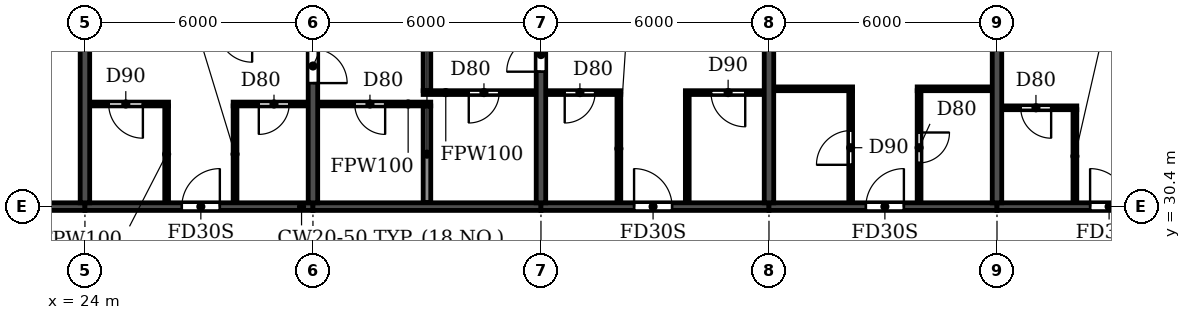
"""IFC4 building model, lengths in metres.
Left out: names, types, materials, properties, quantities, classifications, styles, units other than length and angle.
Written with IfcOpenShell. Run it as: python <this file> out.ifc"""

import sys

from ifc_helpers import new_model, si_unit, direction, frame, frame_2d, origin, place, context, subcontext, project, spatial, rectangle, extrude, element, fill, save


model = new_model("IFC4")
c1 = context("Model", 3, precision=1e-05, world=origin(), true_north=direction((0.0, 1.0)))
c2 = subcontext(c1, "Body", "Model", "MODEL_VIEW")
j1 = project(units=[si_unit("LENGTHUNIT", "METRE"), si_unit("PLANEANGLEUNIT", "RADIAN")], contexts=[c1])
p1 = place(None, origin())
s1 = spatial("IfcSite", under=j1, at=p1, CompositionType="ELEMENT")
p2 = place(p1, origin())
s2 = spatial("IfcBuilding", under=s1, at=p2, CompositionType="ELEMENT")
p3 = place(p2, frame((0.0, 0.0, 231.3)))
s3 = spatial("IfcBuildingStorey", under=s2, at=p3, CompositionType="ELEMENT", Elevation=231.3)
p4 = place(p3, frame((24.0, 30.5, 0.0), z_axis=(0.0, 0.0, 1.0), x_axis=(0.0, 1.0, 0.0)))
e1 = element("IfcWall", 1, at=p4, inside=s3, PredefinedType="SHEAR", context=c2, shape_type="SweptSolid", body=[
    extrude(rectangle(XDim=10.5, YDim=0.25, at=frame_2d((5.25, 0.0))), origin(), (0.0, 0.0, 1.0), 3.08),
])
p5 = place(p3, frame((30.0, 30.5, 0.0), z_axis=(0.0, 0.0, 1.0), x_axis=(0.0, 1.0, 0.0)))
e2 = element("IfcWall", 2, at=p5, inside=s3, PredefinedType="SHEAR", context=c2, shape_type="SweptSolid", body=[
    extrude(rectangle(XDim=10.5, YDim=0.25, at=frame_2d((5.25, 0.0))), origin(), (0.0, 0.0, 1.0), 3.08),
])
p6 = place(p5, frame((3.15, 0.0, 0.0)))
e3 = element("IfcOpeningElement", 3, at=p6, cuts=e2, PredefinedType="OPENING", context=c2, shape_type="SweptSolid", body=[
    extrude(rectangle(XDim=0.9, YDim=2.1, at=frame_2d((0.45, 1.05))), frame((0.0, 0.135, 0.0), z_axis=(0.0, -1.0, 0.0), x_axis=(1.0, 0.0, 0.0)), (0.0, 0.0, 1.0), 0.27),
])
p7 = place(p3, frame((36.0, 30.5, 0.0), z_axis=(0.0, 0.0, 1.0), x_axis=(0.0, 1.0, 0.0)))
e4 = element("IfcWall", 4, at=p7, inside=s3, PredefinedType="SHEAR", context=c2, shape_type="SweptSolid", body=[
    extrude(rectangle(XDim=10.5, YDim=0.25, at=frame_2d((5.25, 0.0))), origin(), (0.0, 0.0, 1.0), 3.08),
])
p8 = place(p7, frame((3.45, 0.0, 0.0)))
e5 = element("IfcOpeningElement", 5, at=p8, cuts=e4, PredefinedType="OPENING", context=c2, shape_type="SweptSolid", body=[
    extrude(rectangle(XDim=0.9, YDim=2.1, at=frame_2d((0.45, 1.05))), frame((0.0, 0.135, 0.0), z_axis=(0.0, -1.0, 0.0), x_axis=(1.0, 0.0, 0.0)), (0.0, 0.0, 1.0), 0.27),
])
for number, where, z_axis, x_axis in (
    (6, (42.0, 30.5, 0.0), (0.0, 0.0, 1.0), (0.0, 1.0, 0.0)),
    (7, (48.0, 30.5, 0.0), (0.0, 0.0, 1.0), (0.0, 1.0, 0.0)),
):
    element("IfcWall", number, at=place(p3, frame(where, z_axis=z_axis, x_axis=x_axis)), inside=s3, PredefinedType="SHEAR", context=c2, shape_type="SweptSolid", body=[
        extrude(rectangle(XDim=10.5, YDim=0.25, at=frame_2d((5.25, 0.0))), origin(), (0.0, 0.0, 1.0), 3.08),
    ])
p9 = place(p3, frame((18.2, 30.4, 0.0), z_axis=(0.0, 0.0, 1.0), x_axis=(1.0, 0.0, 0.0)))
e8 = element("IfcWall", 8, at=p9, inside=s3, PredefinedType="SHEAR", context=c2, shape_type="SweptSolid", body=[
    extrude(rectangle(XDim=5.8, YDim=0.2, at=frame_2d((2.9, 0.0))), origin(), (0.0, 0.0, 1.0), 2.48),
])
p10 = place(p9, frame((2.3, 0.0, 0.0)))
e9 = element("IfcOpeningElement", 9, at=p10, cuts=e8, PredefinedType="OPENING", context=c2, shape_type="SweptSolid", body=[
    extrude(rectangle(XDim=1.0, YDim=2.1, at=frame_2d((0.5, 1.05))), frame((0.0, 0.11, 0.0), z_axis=(0.0, -1.0, 0.0), x_axis=(1.0, 0.0, 0.0)), (0.0, 0.0, 1.0), 0.22),
])
p11 = place(p3, frame((24.0, 30.4, 0.0), z_axis=(0.0, 0.0, 1.0), x_axis=(1.0, 0.0, 0.0)))
e10 = element("IfcWall", 10, at=p11, inside=s3, PredefinedType="SHEAR", context=c2, shape_type="SweptSolid", body=[
    extrude(rectangle(XDim=6.0, YDim=0.2, at=frame_2d((3.0, 0.0))), origin(), (0.0, 0.0, 1.0), 2.48),
])
p12 = place(p11, frame((2.55, 0.0, 0.0)))
e11 = element("IfcOpeningElement", 11, at=p12, cuts=e10, PredefinedType="OPENING", context=c2, shape_type="SweptSolid", body=[
    extrude(rectangle(XDim=1.0, YDim=2.1, at=frame_2d((0.5, 1.05))), frame((0.0, 0.11, 0.0), z_axis=(0.0, -1.0, 0.0), x_axis=(1.0, 0.0, 0.0)), (0.0, 0.0, 1.0), 0.22),
])
p13 = place(p3, frame((30.0, 30.4, 0.0), z_axis=(0.0, 0.0, 1.0), x_axis=(1.0, 0.0, 0.0)))
e12 = element("IfcWall", 12, at=p13, inside=s3, PredefinedType="SHEAR", context=c2, shape_type="SweptSolid", body=[
    extrude(rectangle(XDim=6.0, YDim=0.2, at=frame_2d((3.0, 0.0))), origin(), (0.0, 0.0, 1.0), 2.48),
])
p14 = place(p3, frame((36.0, 30.4, 0.0), z_axis=(0.0, 0.0, 1.0), x_axis=(1.0, 0.0, 0.0)))
e13 = element("IfcWall", 13, at=p14, inside=s3, PredefinedType="SHEAR", context=c2, shape_type="SweptSolid", body=[
    extrude(rectangle(XDim=6.0, YDim=0.2, at=frame_2d((3.0, 0.0))), origin(), (0.0, 0.0, 1.0), 2.48),
])
p15 = place(p14, frame((2.45, 0.0, 0.0)))
e14 = element("IfcOpeningElement", 14, at=p15, cuts=e13, PredefinedType="OPENING", context=c2, shape_type="SweptSolid", body=[
    extrude(rectangle(XDim=1.0, YDim=2.1, at=frame_2d((0.5, 1.05))), frame((0.0, 0.11, 0.0), z_axis=(0.0, -1.0, 0.0), x_axis=(1.0, 0.0, 0.0)), (0.0, 0.0, 1.0), 0.22),
])
p16 = place(p3, frame((42.0, 30.4, 0.0), z_axis=(0.0, 0.0, 1.0), x_axis=(1.0, 0.0, 0.0)))
e15 = element("IfcWall", 15, at=p16, inside=s3, PredefinedType="SHEAR", context=c2, shape_type="SweptSolid", body=[
    extrude(rectangle(XDim=6.0, YDim=0.2, at=frame_2d((3.0, 0.0))), origin(), (0.0, 0.0, 1.0), 2.48),
])
p17 = place(p16, frame((2.55, 0.0, 0.0)))
e16 = element("IfcOpeningElement", 16, at=p17, cuts=e15, PredefinedType="OPENING", context=c2, shape_type="SweptSolid", body=[
    extrude(rectangle(XDim=1.0, YDim=2.1, at=frame_2d((0.5, 1.05))), frame((0.0, 0.11, 0.0), z_axis=(0.0, -1.0, 0.0), x_axis=(1.0, 0.0, 0.0)), (0.0, 0.0, 1.0), 0.22),
])
p18 = place(p3, frame((48.0, 30.4, 0.0), z_axis=(0.0, 0.0, 1.0), x_axis=(1.0, 0.0, 0.0)))
e17 = element("IfcWall", 17, at=p18, inside=s3, PredefinedType="SHEAR", context=c2, shape_type="SweptSolid", body=[
    extrude(rectangle(XDim=6.0, YDim=0.2, at=frame_2d((3.0, 0.0))), origin(), (0.0, 0.0, 1.0), 2.48),
])
p19 = place(p18, frame((2.45, 0.0, 0.0)))
e18 = element("IfcOpeningElement", 18, at=p19, cuts=e17, PredefinedType="OPENING", context=c2, shape_type="SweptSolid", body=[
    extrude(rectangle(XDim=1.0, YDim=2.1, at=frame_2d((0.5, 1.05))), frame((0.0, 0.11, 0.0), z_axis=(0.0, -1.0, 0.0), x_axis=(1.0, 0.0, 0.0)), (0.0, 0.0, 1.0), 0.22),
])
p20 = place(p3, frame((33.0, 30.51, 0.0), z_axis=(0.0, 0.0, 1.0), x_axis=(0.0, 1.0, 0.0)))
e19 = element("IfcWall", 19, at=p20, inside=s3, PredefinedType="PARTITIONING", context=c2, shape_type="SweptSolid", body=[
    extrude(rectangle(XDim=2.54, YDim=0.2, at=frame_2d((1.27, 0.0))), origin(), (0.0, 0.0, 1.0), 3.08),
])
p21 = place(p3, frame((33.0, 33.45, 0.0), z_axis=(0.0, 0.0, 1.0), x_axis=(0.0, 1.0, 0.0)))
e20 = element("IfcWall", 20, at=p21, inside=s3, PredefinedType="PARTITIONING", context=c2, shape_type="SweptSolid", body=[
    extrude(rectangle(XDim=7.69, YDim=0.2, at=frame_2d((3.845, 0.0))), origin(), (0.0, 0.0, 1.0), 3.08),
])
p22 = place(p3, frame((48.135, 33.0, 0.0), z_axis=(0.0, 0.0, 1.0), x_axis=(1.0, 0.0, 0.0)))
e21 = element("IfcWall", 21, at=p22, inside=s3, PredefinedType="PARTITIONING", context=c2, shape_type="SweptSolid", body=[
    extrude(rectangle(XDim=1.965, YDim=0.1, at=frame_2d((0.982, 0.0))), origin(), (0.0, 0.0, 1.0), 3.08),
])
p23 = place(p22, frame((0.49, 0.0, 0.0)))
e22 = element("IfcOpeningElement", 22, at=p23, cuts=e21, PredefinedType="OPENING", context=c2, shape_type="SweptSolid", body=[
    extrude(rectangle(XDim=0.8, YDim=2.1, at=frame_2d((0.4, 1.05))), frame((0.0, 0.06, 0.0), z_axis=(0.0, -1.0, 0.0), x_axis=(1.0, 0.0, 0.0)), (0.0, 0.0, 1.0), 0.12),
])
p24 = place(p3, frame((24.135, 33.1, 0.0), z_axis=(0.0, 0.0, 1.0), x_axis=(1.0, 0.0, 0.0)))
e23 = element("IfcWall", 23, at=p24, inside=s3, PredefinedType="PARTITIONING", context=c2, shape_type="SweptSolid", body=[
    extrude(rectangle(XDim=2.065, YDim=0.1, at=frame_2d((1.032, 0.0))), origin(), (0.0, 0.0, 1.0), 3.08),
])
p25 = place(p24, frame((0.49, 0.0, 0.0)))
e24 = element("IfcOpeningElement", 24, at=p25, cuts=e23, PredefinedType="OPENING", context=c2, shape_type="SweptSolid", body=[
    extrude(rectangle(XDim=0.9, YDim=2.1, at=frame_2d((0.45, 1.05))), frame((0.0, 0.06, 0.0), z_axis=(0.0, -1.0, 0.0), x_axis=(1.0, 0.0, 0.0)), (0.0, 0.0, 1.0), 0.12),
])
p26 = place(p3, frame((27.9, 33.1, 0.0), z_axis=(0.0, 0.0, 1.0), x_axis=(1.0, 0.0, 0.0)))
e25 = element("IfcWall", 25, at=p26, inside=s3, PredefinedType="PARTITIONING", context=c2, shape_type="SweptSolid", body=[
    extrude(rectangle(XDim=1.965, YDim=0.1, at=frame_2d((0.982, 0.0))), origin(), (0.0, 0.0, 1.0), 3.08),
])
p27 = place(p26, frame((0.675, 0.0, 0.0)))
e26 = element("IfcOpeningElement", 26, at=p27, cuts=e25, PredefinedType="OPENING", context=c2, shape_type="SweptSolid", body=[
    extrude(rectangle(XDim=0.8, YDim=2.1, at=frame_2d((0.4, 1.05))), frame((0.0, 0.06, 0.0), z_axis=(0.0, -1.0, 0.0), x_axis=(1.0, 0.0, 0.0)), (0.0, 0.0, 1.0), 0.12),
])
p28 = place(p3, frame((30.135, 33.1, 0.0), z_axis=(0.0, 0.0, 1.0), x_axis=(1.0, 0.0, 0.0)))
e27 = element("IfcWall", 27, at=p28, inside=s3, PredefinedType="PARTITIONING", context=c2, shape_type="SweptSolid", body=[
    extrude(rectangle(XDim=2.965, YDim=0.1, at=frame_2d((1.482, 0.0))), origin(), (0.0, 0.0, 1.0), 3.08),
])
p29 = place(p28, frame((0.965, 0.0, 0.0)))
e28 = element("IfcOpeningElement", 28, at=p29, cuts=e27, PredefinedType="OPENING", context=c2, shape_type="SweptSolid", body=[
    extrude(rectangle(XDim=0.8, YDim=2.1, at=frame_2d((0.4, 1.05))), frame((0.0, 0.06, 0.0), z_axis=(0.0, -1.0, 0.0), x_axis=(1.0, 0.0, 0.0)), (0.0, 0.0, 1.0), 0.12),
])
p30 = place(p3, frame((32.9, 33.4, 0.0), z_axis=(0.0, 0.0, 1.0), x_axis=(1.0, 0.0, 0.0)))
e29 = element("IfcWall", 29, at=p30, inside=s3, PredefinedType="PARTITIONING", context=c2, shape_type="SweptSolid", body=[
    extrude(rectangle(XDim=2.965, YDim=0.1, at=frame_2d((1.482, 0.0))), origin(), (0.0, 0.0, 1.0), 3.08),
])
p31 = place(p30, frame((1.2, 0.0, 0.0)))
e30 = element("IfcOpeningElement", 30, at=p31, cuts=e29, PredefinedType="OPENING", context=c2, shape_type="SweptSolid", body=[
    extrude(rectangle(XDim=0.8, YDim=2.1, at=frame_2d((0.4, 1.05))), frame((0.0, 0.06, 0.0), z_axis=(0.0, -1.0, 0.0), x_axis=(1.0, 0.0, 0.0)), (0.0, 0.0, 1.0), 0.12),
])
p32 = place(p3, frame((36.135, 33.4, 0.0), z_axis=(0.0, 0.0, 1.0), x_axis=(1.0, 0.0, 0.0)))
e31 = element("IfcWall", 31, at=p32, inside=s3, PredefinedType="PARTITIONING", context=c2, shape_type="SweptSolid", body=[
    extrude(rectangle(XDim=1.965, YDim=0.1, at=frame_2d((0.982, 0.0))), origin(), (0.0, 0.0, 1.0), 3.08),
])
p33 = place(p32, frame((0.49, 0.0, 0.0)))
e32 = element("IfcOpeningElement", 32, at=p33, cuts=e31, PredefinedType="OPENING", context=c2, shape_type="SweptSolid", body=[
    extrude(rectangle(XDim=0.8, YDim=2.1, at=frame_2d((0.4, 1.05))), frame((0.0, 0.06, 0.0), z_axis=(0.0, -1.0, 0.0), x_axis=(1.0, 0.0, 0.0)), (0.0, 0.0, 1.0), 0.12),
])
p34 = place(p3, frame((39.8, 33.4, 0.0), z_axis=(0.0, 0.0, 1.0), x_axis=(1.0, 0.0, 0.0)))
e33 = element("IfcWall", 33, at=p34, inside=s3, PredefinedType="PARTITIONING", context=c2, shape_type="SweptSolid", body=[
    extrude(rectangle(XDim=2.065, YDim=0.1, at=frame_2d((1.032, 0.0))), origin(), (0.0, 0.0, 1.0), 3.08),
])
p35 = place(p34, frame((0.675, 0.0, 0.0)))
e34 = element("IfcOpeningElement", 34, at=p35, cuts=e33, PredefinedType="OPENING", context=c2, shape_type="SweptSolid", body=[
    extrude(rectangle(XDim=0.9, YDim=2.1, at=frame_2d((0.45, 1.05))), frame((0.0, 0.06, 0.0), z_axis=(0.0, -1.0, 0.0), x_axis=(1.0, 0.0, 0.0)), (0.0, 0.0, 1.0), 0.12),
])
p36 = place(p3, frame((42.135, 33.5, 0.0), z_axis=(0.0, 0.0, 1.0), x_axis=(1.0, 0.0, 0.0)))
e35 = element("IfcWall", 35, at=p36, inside=s3, PredefinedType="PARTITIONING", context=c2, shape_type="SweptSolid", body=[
    extrude(rectangle(XDim=2.065, YDim=0.1, at=frame_2d((1.032, 0.0))), origin(), (0.0, 0.0, 1.0), 3.08),
])
p37 = place(p3, frame((45.9, 33.5, 0.0), z_axis=(0.0, 0.0, 1.0), x_axis=(1.0, 0.0, 0.0)))
e36 = element("IfcWall", 36, at=p37, inside=s3, PredefinedType="PARTITIONING", context=c2, shape_type="SweptSolid", body=[
    extrude(rectangle(XDim=1.965, YDim=0.1, at=frame_2d((0.982, 0.0))), origin(), (0.0, 0.0, 1.0), 3.08),
])
for number, where, z_axis, x_axis in (
    (37, (26.15, 30.51, 0.0), (0.0, 0.0, 1.0), (0.0, 1.0, 0.0)),
    (38, (27.95, 30.51, 0.0), (0.0, 0.0, 1.0), (0.0, 1.0, 0.0)),
):
    element("IfcWall", number, at=place(p3, frame(where, z_axis=z_axis, x_axis=x_axis)), inside=s3, PredefinedType="PARTITIONING", context=c2, shape_type="SweptSolid", body=[
        extrude(rectangle(XDim=2.54, YDim=0.1, at=frame_2d((1.27, 0.0))), origin(), (0.0, 0.0, 1.0), 3.08),
    ])
for number, where, z_axis, x_axis in (
    (39, (38.05, 30.51, 0.0), (0.0, 0.0, 1.0), (0.0, 1.0, 0.0)),
    (40, (39.85, 30.51, 0.0), (0.0, 0.0, 1.0), (0.0, 1.0, 0.0)),
):
    element("IfcWall", number, at=place(p3, frame(where, z_axis=z_axis, x_axis=x_axis)), inside=s3, PredefinedType="PARTITIONING", context=c2, shape_type="SweptSolid", body=[
        extrude(rectangle(XDim=2.84, YDim=0.1, at=frame_2d((1.42, 0.0))), origin(), (0.0, 0.0, 1.0), 3.08),
    ])
p38 = place(p3, frame((44.15, 30.51, 0.0), z_axis=(0.0, 0.0, 1.0), x_axis=(0.0, 1.0, 0.0)))
e41 = element("IfcWall", 41, at=p38, inside=s3, PredefinedType="PARTITIONING", context=c2, shape_type="SweptSolid", body=[
    extrude(rectangle(XDim=2.94, YDim=0.1, at=frame_2d((1.47, 0.0))), origin(), (0.0, 0.0, 1.0), 3.08),
])
p39 = place(p38, frame((0.99, 0.0, 0.0)))
e42 = element("IfcOpeningElement", 42, at=p39, cuts=e41, PredefinedType="OPENING", context=c2, shape_type="SweptSolid", body=[
    extrude(rectangle(XDim=0.9, YDim=2.1, at=frame_2d((0.45, 1.05))), frame((0.0, 0.06, 0.0), z_axis=(0.0, -1.0, 0.0), x_axis=(1.0, 0.0, 0.0)), (0.0, 0.0, 1.0), 0.12),
])
p40 = place(p3, frame((45.95, 30.51, 0.0), z_axis=(0.0, 0.0, 1.0), x_axis=(0.0, 1.0, 0.0)))
e43 = element("IfcWall", 43, at=p40, inside=s3, PredefinedType="PARTITIONING", context=c2, shape_type="SweptSolid", body=[
    extrude(rectangle(XDim=2.94, YDim=0.1, at=frame_2d((1.47, 0.0))), origin(), (0.0, 0.0, 1.0), 3.08),
])
p41 = place(p40, frame((1.04, 0.0, 0.0)))
e44 = element("IfcOpeningElement", 44, at=p41, cuts=e43, PredefinedType="OPENING", context=c2, shape_type="SweptSolid", body=[
    extrude(rectangle(XDim=0.8, YDim=2.1, at=frame_2d((0.4, 1.05))), frame((0.0, 0.06, 0.0), z_axis=(0.0, -1.0, 0.0), x_axis=(1.0, 0.0, 0.0)), (0.0, 0.0, 1.0), 0.12),
])
p42 = place(p3, frame((50.05, 30.51, 0.0), z_axis=(0.0, 0.0, 1.0), x_axis=(0.0, 1.0, 0.0)))
e45 = element("IfcWall", 45, at=p42, inside=s3, PredefinedType="PARTITIONING", context=c2, shape_type="SweptSolid", body=[
    extrude(rectangle(XDim=2.44, YDim=0.1, at=frame_2d((1.22, 0.0))), origin(), (0.0, 0.0, 1.0), 3.08),
])
p43 = place(p29, frame((0.8, 0.0, 0.0), z_axis=(0.0, 0.0, 1.0), x_axis=(-1.0, 0.0, 0.0)))
e46 = element("IfcDoor", 46, at=p43, inside=s3, OperationType="SINGLE_SWING_LEFT", PredefinedType="DOOR", context=c2, shape_type="SweptSolid", body=[
    extrude(rectangle(XDim=0.8, YDim=2.1, at=frame_2d((0.4, 1.05))), frame((0.0, 0.025, 0.0), z_axis=(0.0, -1.0, 0.0), x_axis=(1.0, 0.0, 0.0)), (0.0, 0.0, 1.0), 0.05),
])
fill(e28, e46)
p44 = place(p25, frame((0.9, 0.0, 0.0), z_axis=(0.0, 0.0, 1.0), x_axis=(-1.0, 0.0, 0.0)))
e47 = element("IfcDoor", 47, at=p44, inside=s3, OperationType="SINGLE_SWING_LEFT", PredefinedType="DOOR", context=c2, shape_type="SweptSolid", body=[
    extrude(rectangle(XDim=0.9, YDim=2.1, at=frame_2d((0.45, 1.05))), frame((0.0, 0.025, 0.0), z_axis=(0.0, -1.0, 0.0), x_axis=(1.0, 0.0, 0.0)), (0.0, 0.0, 1.0), 0.05),
])
fill(e24, e47)
p45 = place(p12, origin())
e48 = element("IfcDoor", 48, at=p45, inside=s3, OperationType="SINGLE_SWING_RIGHT", PredefinedType="DOOR", context=c2, shape_type="SweptSolid", body=[
    extrude(rectangle(XDim=1.0, YDim=2.1, at=frame_2d((0.5, 1.05))), frame((0.0, 0.025, 0.0), z_axis=(0.0, -1.0, 0.0), x_axis=(1.0, 0.0, 0.0)), (0.0, 0.0, 1.0), 0.05),
])
fill(e11, e48)
p46 = place(p27, frame((0.8, 0.0, 0.0), z_axis=(0.0, 0.0, 1.0), x_axis=(-1.0, 0.0, 0.0)))
e49 = element("IfcDoor", 49, at=p46, inside=s3, OperationType="SINGLE_SWING_RIGHT", PredefinedType="DOOR", context=c2, shape_type="SweptSolid", body=[
    extrude(rectangle(XDim=0.8, YDim=2.1, at=frame_2d((0.4, 1.05))), frame((0.0, 0.025, 0.0), z_axis=(0.0, -1.0, 0.0), x_axis=(1.0, 0.0, 0.0)), (0.0, 0.0, 1.0), 0.05),
])
fill(e26, e49)
p47 = place(p6, frame((0.9, 0.0, 0.0), z_axis=(0.0, 0.0, 1.0), x_axis=(-1.0, 0.0, 0.0)))
e50 = element("IfcDoor", 50, at=p47, inside=s3, OperationType="SINGLE_SWING_RIGHT", PredefinedType="DOOR", context=c2, shape_type="SweptSolid", body=[
    extrude(rectangle(XDim=0.9, YDim=2.1, at=frame_2d((0.45, 1.05))), frame((0.0, 0.025, 0.0), z_axis=(0.0, -1.0, 0.0), x_axis=(1.0, 0.0, 0.0)), (0.0, 0.0, 1.0), 0.05),
])
fill(e3, e50)
p48 = place(p31, frame((0.8, 0.0, 0.0), z_axis=(0.0, 0.0, 1.0), x_axis=(-1.0, 0.0, 0.0)))
e51 = element("IfcDoor", 51, at=p48, inside=s3, OperationType="SINGLE_SWING_RIGHT", PredefinedType="DOOR", context=c2, shape_type="SweptSolid", body=[
    extrude(rectangle(XDim=0.8, YDim=2.1, at=frame_2d((0.4, 1.05))), frame((0.0, 0.025, 0.0), z_axis=(0.0, -1.0, 0.0), x_axis=(1.0, 0.0, 0.0)), (0.0, 0.0, 1.0), 0.05),
])
fill(e30, e51)
p49 = place(p8, origin())
e52 = element("IfcDoor", 52, at=p49, inside=s3, OperationType="SINGLE_SWING_LEFT", PredefinedType="DOOR", context=c2, shape_type="SweptSolid", body=[
    extrude(rectangle(XDim=0.9, YDim=2.1, at=frame_2d((0.45, 1.05))), frame((0.0, 0.025, 0.0), z_axis=(0.0, -1.0, 0.0), x_axis=(1.0, 0.0, 0.0)), (0.0, 0.0, 1.0), 0.05),
])
fill(e5, e52)
p50 = place(p33, frame((0.8, 0.0, 0.0), z_axis=(0.0, 0.0, 1.0), x_axis=(-1.0, 0.0, 0.0)))
e53 = element("IfcDoor", 53, at=p50, inside=s3, OperationType="SINGLE_SWING_RIGHT", PredefinedType="DOOR", context=c2, shape_type="SweptSolid", body=[
    extrude(rectangle(XDim=0.8, YDim=2.1, at=frame_2d((0.4, 1.05))), frame((0.0, 0.025, 0.0), z_axis=(0.0, -1.0, 0.0), x_axis=(1.0, 0.0, 0.0)), (0.0, 0.0, 1.0), 0.05),
])
fill(e32, e53)
p51 = place(p15, origin())
e54 = element("IfcDoor", 54, at=p51, inside=s3, OperationType="SINGLE_SWING_LEFT", PredefinedType="DOOR", context=c2, shape_type="SweptSolid", body=[
    extrude(rectangle(XDim=1.0, YDim=2.1, at=frame_2d((0.5, 1.05))), frame((0.0, 0.025, 0.0), z_axis=(0.0, -1.0, 0.0), x_axis=(1.0, 0.0, 0.0)), (0.0, 0.0, 1.0), 0.05),
])
fill(e14, e54)
p52 = place(p35, frame((0.9, 0.0, 0.0), z_axis=(0.0, 0.0, 1.0), x_axis=(-1.0, 0.0, 0.0)))
e55 = element("IfcDoor", 55, at=p52, inside=s3, OperationType="SINGLE_SWING_LEFT", PredefinedType="DOOR", context=c2, shape_type="SweptSolid", body=[
    extrude(rectangle(XDim=0.9, YDim=2.1, at=frame_2d((0.45, 1.05))), frame((0.0, 0.025, 0.0), z_axis=(0.0, -1.0, 0.0), x_axis=(1.0, 0.0, 0.0)), (0.0, 0.0, 1.0), 0.05),
])
fill(e34, e55)
p53 = place(p39, origin())
e56 = element("IfcDoor", 56, at=p53, inside=s3, OperationType="SINGLE_SWING_LEFT", PredefinedType="DOOR", context=c2, shape_type="SweptSolid", body=[
    extrude(rectangle(XDim=0.9, YDim=2.1, at=frame_2d((0.45, 1.05))), frame((0.0, 0.025, 0.0), z_axis=(0.0, -1.0, 0.0), x_axis=(1.0, 0.0, 0.0)), (0.0, 0.0, 1.0), 0.05),
])
fill(e42, e56)
p54 = place(p17, origin())
e57 = element("IfcDoor", 57, at=p54, inside=s3, OperationType="SINGLE_SWING_RIGHT", PredefinedType="DOOR", context=c2, shape_type="SweptSolid", body=[
    extrude(rectangle(XDim=1.0, YDim=2.1, at=frame_2d((0.5, 1.05))), frame((0.0, 0.025, 0.0), z_axis=(0.0, -1.0, 0.0), x_axis=(1.0, 0.0, 0.0)), (0.0, 0.0, 1.0), 0.05),
])
fill(e16, e57)
p55 = place(p41, frame((0.8, 0.0, 0.0), z_axis=(0.0, 0.0, 1.0), x_axis=(-1.0, 0.0, 0.0)))
e58 = element("IfcDoor", 58, at=p55, inside=s3, OperationType="SINGLE_SWING_LEFT", PredefinedType="DOOR", context=c2, shape_type="SweptSolid", body=[
    extrude(rectangle(XDim=0.8, YDim=2.1, at=frame_2d((0.4, 1.05))), frame((0.0, 0.025, 0.0), z_axis=(0.0, -1.0, 0.0), x_axis=(1.0, 0.0, 0.0)), (0.0, 0.0, 1.0), 0.05),
])
fill(e44, e58)
p56 = place(p23, frame((0.8, 0.0, 0.0), z_axis=(0.0, 0.0, 1.0), x_axis=(-1.0, 0.0, 0.0)))
e59 = element("IfcDoor", 59, at=p56, inside=s3, OperationType="SINGLE_SWING_LEFT", PredefinedType="DOOR", context=c2, shape_type="SweptSolid", body=[
    extrude(rectangle(XDim=0.8, YDim=2.1, at=frame_2d((0.4, 1.05))), frame((0.0, 0.025, 0.0), z_axis=(0.0, -1.0, 0.0), x_axis=(1.0, 0.0, 0.0)), (0.0, 0.0, 1.0), 0.05),
])
fill(e22, e59)
p57 = place(p19, origin())
e60 = element("IfcDoor", 60, at=p57, inside=s3, OperationType="SINGLE_SWING_LEFT", PredefinedType="DOOR", context=c2, shape_type="SweptSolid", body=[
    extrude(rectangle(XDim=1.0, YDim=2.1, at=frame_2d((0.5, 1.05))), frame((0.0, 0.025, 0.0), z_axis=(0.0, -1.0, 0.0), x_axis=(1.0, 0.0, 0.0)), (0.0, 0.0, 1.0), 0.05),
])
fill(e18, e60)
save(model, sys.argv[1])
